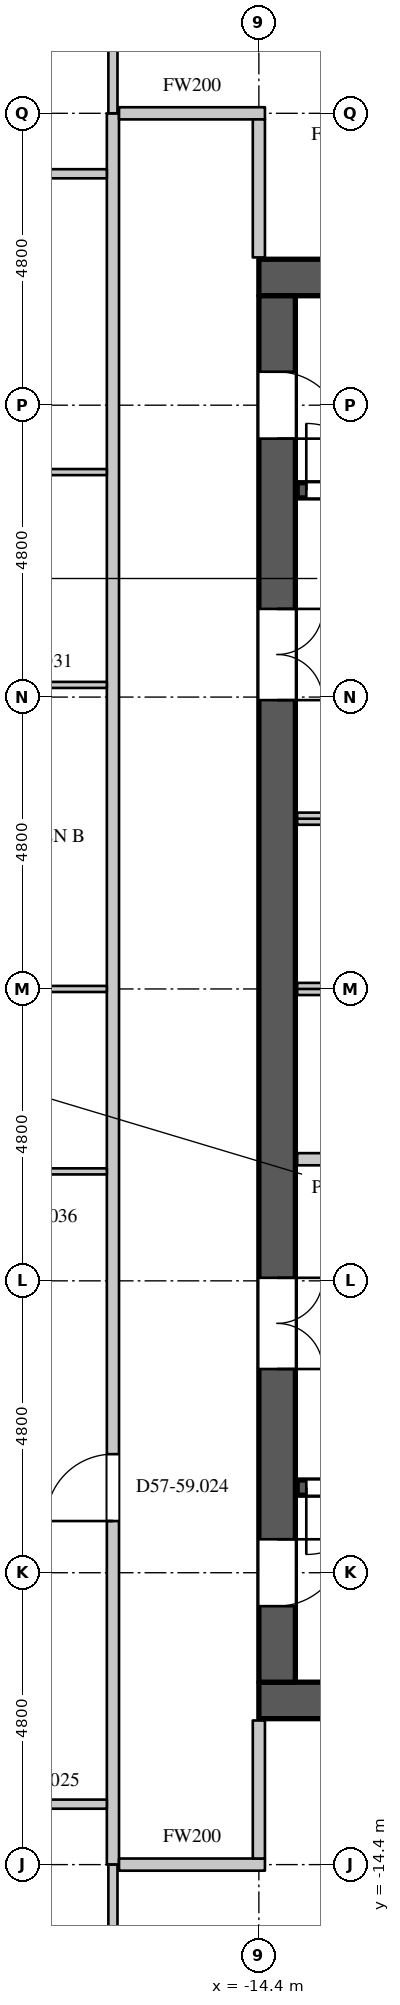
"""IFC4 building model, lengths in metres.
Left out: names, types, materials, properties, quantities, classifications, styles, units other than length and angle.
Written with IfcOpenShell. Run it as: python <this file> out.ifc"""

import sys

from ifc_helpers import new_model, si_unit, direction, frame, frame_2d, origin, place, context, subcontext, project, spatial, rectangle, extrude, element, fill, save


model = new_model("IFC4")
c1 = context("Model", 3, precision=1e-05, world=origin(), true_north=direction((0.0, 1.0)))
c2 = subcontext(c1, "Body", "Model", "MODEL_VIEW")
j1 = project(units=[si_unit("LENGTHUNIT", "METRE"), si_unit("PLANEANGLEUNIT", "RADIAN")], contexts=[c1])
p1 = place(None, origin())
s1 = spatial("IfcSite", under=j1, at=p1, CompositionType="ELEMENT")
p2 = place(p1, origin())
s2 = spatial("IfcBuilding", under=s1, at=p2, CompositionType="ELEMENT")
p3 = place(p2, frame((0.0, 0.0, 247.5)))
s3 = spatial("IfcBuildingStorey", under=s2, at=p3, CompositionType="ELEMENT", Elevation=247.5)
for number, where, z_axis, x_axis in (
    (1, (-14.4, 11.7, 0.0), (0.0, 0.0, 1.0), (1.0, 0.0, 0.0)),
    (2, (-14.4, -11.7, 0.0), (0.0, 0.0, 1.0), (1.0, 0.0, 0.0)),
):
    element("IfcWall", number, at=place(p3, frame(where, z_axis=z_axis, x_axis=x_axis)), inside=s3, PredefinedType="SHEAR", context=c2, shape_type="SweptSolid", body=[
        extrude(rectangle(XDim=28.8, YDim=0.6, at=frame_2d((14.4, 0.0))), origin(), (0.0, 0.0, 1.0), 4.2),
    ])
p4 = place(p3, frame((-14.1, -11.4, 0.0), z_axis=(0.0, 0.0, 1.0), x_axis=(0.0, 1.0, 0.0)))
e3 = element("IfcWall", 3, at=p4, inside=s3, PredefinedType="SHEAR", context=c2, shape_type="SweptSolid", body=[
    extrude(rectangle(XDim=22.8, YDim=0.6, at=frame_2d((11.4, 0.0))), origin(), (0.0, 0.0, 1.0), 4.2),
])
p5 = place(p4, frame((20.45, 0.0, 0.0)))
e4 = element("IfcOpeningElement", 4, at=p5, cuts=e3, PredefinedType="OPENING", context=c2, shape_type="SweptSolid", body=[
    extrude(rectangle(XDim=1.1, YDim=2.2, at=frame_2d((0.55, 1.1))), frame((0.0, 0.31, 0.0), z_axis=(0.0, -1.0, 0.0), x_axis=(1.0, 0.0, 0.0)), (0.0, 0.0, 1.0), 0.62),
])
p6 = place(p4, frame((1.25, 0.0, 0.0)))
e5 = element("IfcOpeningElement", 5, at=p6, cuts=e3, PredefinedType="OPENING", context=c2, shape_type="SweptSolid", body=[
    extrude(rectangle(XDim=1.1, YDim=2.2, at=frame_2d((0.55, 1.1))), frame((0.0, 0.31, 0.0), z_axis=(0.0, -1.0, 0.0), x_axis=(1.0, 0.0, 0.0)), (0.0, 0.0, 1.0), 0.62),
])
p7 = place(p4, frame((16.15, 0.0, 0.0)))
e6 = element("IfcOpeningElement", 6, at=p7, cuts=e3, PredefinedType="OPENING", context=c2, shape_type="SweptSolid", body=[
    extrude(rectangle(XDim=1.5, YDim=2.4, at=frame_2d((0.75, 1.2))), frame((0.0, 0.31, 0.0), z_axis=(0.0, -1.0, 0.0), x_axis=(1.0, 0.0, 0.0)), (0.0, 0.0, 1.0), 0.62),
])
p8 = place(p4, frame((5.15, 0.0, 0.0)))
e7 = element("IfcOpeningElement", 7, at=p8, cuts=e3, PredefinedType="OPENING", context=c2, shape_type="SweptSolid", body=[
    extrude(rectangle(XDim=1.5, YDim=2.4, at=frame_2d((0.75, 1.2))), frame((0.0, 0.31, 0.0), z_axis=(0.0, -1.0, 0.0), x_axis=(1.0, 0.0, 0.0)), (0.0, 0.0, 1.0), 0.62),
])
p9 = place(p3, frame((-16.8, -14.4, 0.0), z_axis=(0.0, 0.0, 1.0), x_axis=(0.0, 1.0, 0.0)))
e8 = element("IfcWall", 8, at=p9, inside=s3, PredefinedType="PARTITIONING", context=c2, shape_type="SweptSolid", body=[
    extrude(rectangle(XDim=28.8, YDim=0.2, at=frame_2d((14.4, 0.0))), origin(), (0.0, 0.0, 1.0), 3.95),
])
p10 = place(p9, frame((5.65, 0.0, 0.0)))
e9 = element("IfcOpeningElement", 9, at=p10, cuts=e8, PredefinedType="OPENING", context=c2, shape_type="SweptSolid", body=[
    extrude(rectangle(XDim=1.1, YDim=2.4, at=frame_2d((0.55, 1.2))), frame((0.0, 0.11, 0.0), z_axis=(0.0, -1.0, 0.0), x_axis=(1.0, 0.0, 0.0)), (0.0, 0.0, 1.0), 0.22),
])
for number, where, z_axis, x_axis in (
    (10, (-16.7, -14.4, 0.0), (0.0, 0.0, 1.0), (1.0, 0.0, 0.0)),
    (11, (-16.7, 14.4, 0.0), (0.0, 0.0, 1.0), (1.0, 0.0, 0.0)),
):
    element("IfcWall", number, at=place(p3, frame(where, z_axis=z_axis, x_axis=x_axis)), inside=s3, PredefinedType="PARTITIONING", context=c2, shape_type="SweptSolid", body=[
        extrude(rectangle(XDim=2.4, YDim=0.2, at=frame_2d((1.2, 0.0))), origin(), (0.0, 0.0, 1.0), 3.95),
    ])
for number, where, z_axis, x_axis in (
    (12, (-14.4, -14.3, 0.0), (0.0, 0.0, 1.0), (0.0, 1.0, 0.0)),
    (13, (-14.4, 12.03, 0.0), (0.0, 0.0, 1.0), (0.0, 1.0, 0.0)),
):
    element("IfcWall", number, at=place(p3, frame(where, z_axis=z_axis, x_axis=x_axis)), inside=s3, PredefinedType="PARTITIONING", context=c2, shape_type="SweptSolid", body=[
        extrude(rectangle(XDim=2.27, YDim=0.2, at=frame_2d((1.135, 0.0))), origin(), (0.0, 0.0, 1.0), 3.95),
    ])
p11 = place(p3, frame((-25.224, -13.406, 0.0), z_axis=(0.0, 0.0, 1.0), x_axis=(1.0, 0.0, 0.0)))
e14 = element("IfcWall", 14, at=p11, inside=s3, PredefinedType="PARTITIONING", context=c2, shape_type="SweptSolid", body=[
    extrude(rectangle(XDim=8.324, YDim=0.15, at=frame_2d((4.162, 0.0))), origin(), (0.0, 0.0, 1.0), 3.95),
])
p12 = place(p11, frame((5.993, 0.0, 0.0)))
e15 = element("IfcOpeningElement", 15, at=p12, cuts=e14, PredefinedType="OPENING", context=c2, shape_type="SweptSolid", body=[
    extrude(rectangle(XDim=0.95, YDim=2.2, at=frame_2d((0.475, 1.1))), frame((0.0, 0.085, 0.0), z_axis=(0.0, -1.0, 0.0), x_axis=(1.0, 0.0, 0.0)), (0.0, 0.0, 1.0), 0.17),
])
p13 = place(p3, frame((-25.224, 13.406, 0.0), z_axis=(0.0, 0.0, 1.0), x_axis=(1.0, 0.0, 0.0)))
e16 = element("IfcWall", 16, at=p13, inside=s3, PredefinedType="PARTITIONING", context=c2, shape_type="SweptSolid", body=[
    extrude(rectangle(XDim=8.324, YDim=0.15, at=frame_2d((4.162, 0.0))), origin(), (0.0, 0.0, 1.0), 3.95),
])
p14 = place(p13, frame((1.693, 0.0, 0.0)))
e17 = element("IfcOpeningElement", 17, at=p14, cuts=e16, PredefinedType="OPENING", context=c2, shape_type="SweptSolid", body=[
    extrude(rectangle(XDim=1.5, YDim=2.2, at=frame_2d((0.75, 1.1))), frame((0.0, 0.085, 0.0), z_axis=(0.0, -1.0, 0.0), x_axis=(1.0, 0.0, 0.0)), (0.0, 0.0, 1.0), 0.17),
])
p15 = place(p3, frame((-16.8, -19.828, 0.0), z_axis=(0.0, 0.0, 1.0), x_axis=(0.0, 1.0, 0.0)))
e18 = element("IfcWall", 18, at=p15, inside=s3, PredefinedType="PARTITIONING", context=c2, shape_type="SweptSolid", body=[
    extrude(rectangle(XDim=5.428, YDim=0.15, at=frame_2d((2.714, 0.0))), origin(), (0.0, 0.0, 1.0), 3.95),
])
p16 = place(p15, frame((3.1, 0.0, 0.0)))
e19 = element("IfcOpeningElement", 19, at=p16, cuts=e18, PredefinedType="OPENING", context=c2, shape_type="SweptSolid", body=[
    extrude(rectangle(XDim=0.95, YDim=2.2, at=frame_2d((0.475, 1.1))), frame((0.0, 0.085, 0.0), z_axis=(0.0, -1.0, 0.0), x_axis=(1.0, 0.0, 0.0)), (0.0, 0.0, 1.0), 0.17),
])
p17 = place(p3, frame((-16.8, 14.4, 0.0), z_axis=(0.0, 0.0, 1.0), x_axis=(0.0, 1.0, 0.0)))
e20 = element("IfcWall", 20, at=p17, inside=s3, PredefinedType="PARTITIONING", context=c2, shape_type="SweptSolid", body=[
    extrude(rectangle(XDim=5.428, YDim=0.15, at=frame_2d((2.714, 0.0))), origin(), (0.0, 0.0, 1.0), 3.95),
])
p18 = place(p17, frame((1.3, 0.0, 0.0)))
e21 = element("IfcOpeningElement", 21, at=p18, cuts=e20, PredefinedType="OPENING", context=c2, shape_type="SweptSolid", body=[
    extrude(rectangle(XDim=0.95, YDim=2.2, at=frame_2d((0.475, 1.1))), frame((0.0, 0.085, 0.0), z_axis=(0.0, -1.0, 0.0), x_axis=(1.0, 0.0, 0.0)), (0.0, 0.0, 1.0), 0.17),
])
p19 = place(p3, frame((-13.77, -2.8, 0.0), z_axis=(0.0, 0.0, 1.0), x_axis=(1.0, 0.0, 0.0)))
e22 = element("IfcWall", 22, at=p19, inside=s3, PredefinedType="PARTITIONING", context=c2, shape_type="SweptSolid", body=[
    extrude(rectangle(XDim=3.37, YDim=0.2, at=frame_2d((1.685, 0.0))), origin(), (0.0, 0.0, 1.0), 3.95),
])
p20 = place(p19, frame((1.35, 0.0, 0.0)))
e23 = element("IfcOpeningElement", 23, at=p20, cuts=e22, PredefinedType="OPENING", context=c2, shape_type="SweptSolid", body=[
    extrude(rectangle(XDim=0.6, YDim=2.0, at=frame_2d((0.3, 1.0))), frame((0.0, 0.11, 0.0), z_axis=(0.0, -1.0, 0.0), x_axis=(1.0, 0.0, 0.0)), (0.0, 0.0, 1.0), 0.22),
])
p21 = place(p3, frame((-13.77, 0.0, 0.0), z_axis=(0.0, 0.0, 1.0), x_axis=(1.0, 0.0, 0.0)))
e24 = element("IfcWall", 24, at=p21, inside=s3, PredefinedType="PARTITIONING", context=c2, shape_type="SweptSolid", body=[
    extrude(rectangle(XDim=21.57, YDim=0.2, at=frame_2d((10.785, 0.0))), origin(), (0.0, 0.0, 1.0), 3.95),
])
p22 = place(p3, frame((-13.77, 2.8, 0.0), z_axis=(0.0, 0.0, 1.0), x_axis=(1.0, 0.0, 0.0)))
e25 = element("IfcWall", 25, at=p22, inside=s3, PredefinedType="PARTITIONING", context=c2, shape_type="SweptSolid", body=[
    extrude(rectangle(XDim=5.95, YDim=0.2, at=frame_2d((2.975, 0.0))), origin(), (0.0, 0.0, 1.0), 3.95),
])
p23 = place(p22, frame((1.1, 0.0, 0.0)))
e26 = element("IfcOpeningElement", 26, at=p23, cuts=e25, PredefinedType="OPENING", context=c2, shape_type="SweptSolid", body=[
    extrude(rectangle(XDim=1.1, YDim=2.2, at=frame_2d((0.55, 1.1))), frame((0.0, 0.11, 0.0), z_axis=(0.0, -1.0, 0.0), x_axis=(1.0, 0.0, 0.0)), (0.0, 0.0, 1.0), 0.22),
])
p24 = place(p22, frame((4.1, 0.0, 0.0)))
e27 = element("IfcOpeningElement", 27, at=p24, cuts=e25, PredefinedType="OPENING", context=c2, shape_type="SweptSolid", body=[
    extrude(rectangle(XDim=1.1, YDim=2.2, at=frame_2d((0.55, 1.1))), frame((0.0, 0.11, 0.0), z_axis=(0.0, -1.0, 0.0), x_axis=(1.0, 0.0, 0.0)), (0.0, 0.0, 1.0), 0.22),
])
p25 = place(p3, frame((-13.77, -8.2, 0.0), z_axis=(0.0, 0.0, 1.0), x_axis=(1.0, 0.0, 0.0)))
e28 = element("IfcWall", 28, at=p25, inside=s3, PredefinedType="SHEAR", context=c2, shape_type="SweptSolid", body=[
    extrude(rectangle(XDim=8.495, YDim=0.25, at=frame_2d((4.248, 0.0))), origin(), (0.0, 0.0, 1.0), 3.95),
])
p26 = place(p25, frame((0.15, 0.0, 0.0)))
e29 = element("IfcOpeningElement", 29, at=p26, cuts=e28, PredefinedType="OPENING", context=c2, shape_type="SweptSolid", body=[
    extrude(rectangle(XDim=1.1, YDim=2.2, at=frame_2d((0.55, 1.1))), frame((0.0, 0.135, 0.0), z_axis=(0.0, -1.0, 0.0), x_axis=(1.0, 0.0, 0.0)), (0.0, 0.0, 1.0), 0.27),
])
p27 = place(p3, frame((-13.77, 8.2, 0.0), z_axis=(0.0, 0.0, 1.0), x_axis=(1.0, 0.0, 0.0)))
e30 = element("IfcWall", 30, at=p27, inside=s3, PredefinedType="SHEAR", context=c2, shape_type="SweptSolid", body=[
    extrude(rectangle(XDim=8.495, YDim=0.25, at=frame_2d((4.248, 0.0))), origin(), (0.0, 0.0, 1.0), 3.95),
])
p28 = place(p27, frame((0.15, 0.0, 0.0)))
e31 = element("IfcOpeningElement", 31, at=p28, cuts=e30, PredefinedType="OPENING", context=c2, shape_type="SweptSolid", body=[
    extrude(rectangle(XDim=1.1, YDim=2.2, at=frame_2d((0.55, 1.1))), frame((0.0, 0.135, 0.0), z_axis=(0.0, -1.0, 0.0), x_axis=(1.0, 0.0, 0.0)), (0.0, 0.0, 1.0), 0.27),
])
p29 = place(p3, frame((-20.85, -3.0, 0.0), z_axis=(0.0, 0.0, 1.0), x_axis=(1.0, 0.0, 0.0)))
e32 = element("IfcWall", 32, at=p29, inside=s3, PredefinedType="PARTITIONING", context=c2, shape_type="SweptSolid", body=[
    extrude(rectangle(XDim=3.95, YDim=0.1, at=frame_2d((1.975, 0.0))), origin(), (0.0, 0.0, 1.0), 3.95),
])
p30 = place(p29, frame((1.5, 0.0, 0.0)))
e33 = element("IfcOpeningElement", 33, at=p30, cuts=e32, PredefinedType="OPENING", context=c2, shape_type="SweptSolid", body=[
    extrude(rectangle(XDim=0.9, YDim=2.2, at=frame_2d((0.45, 1.1))), frame((0.0, 0.06, 0.0), z_axis=(0.0, -1.0, 0.0), x_axis=(1.0, 0.0, 0.0)), (0.0, 0.0, 1.0), 0.12),
])
p31 = place(p3, frame((-20.88, 0.0, 0.0), z_axis=(0.0, 0.0, 1.0), x_axis=(1.0, 0.0, 0.0)))
e34 = element("IfcWall", 34, at=p31, inside=s3, PredefinedType="PARTITIONING", context=c2, shape_type="SweptSolid", body=[
    extrude(rectangle(XDim=3.98, YDim=0.1, at=frame_2d((1.99, 0.0))), origin(), (0.0, 0.0, 1.0), 3.95),
])
p32 = place(p3, frame((-20.825, 5.0, 0.0), z_axis=(0.0, 0.0, 1.0), x_axis=(1.0, 0.0, 0.0)))
e35 = element("IfcWall", 35, at=p32, inside=s3, PredefinedType="PARTITIONING", context=c2, shape_type="SweptSolid", body=[
    extrude(rectangle(XDim=3.925, YDim=0.1, at=frame_2d((1.962, 0.0))), origin(), (0.0, 0.0, 1.0), 3.95),
])
p33 = place(p32, frame((1.5, 0.0, 0.0)))
e36 = element("IfcOpeningElement", 36, at=p33, cuts=e35, PredefinedType="OPENING", context=c2, shape_type="SweptSolid", body=[
    extrude(rectangle(XDim=0.9, YDim=2.2, at=frame_2d((0.45, 1.1))), frame((0.0, 0.06, 0.0), z_axis=(0.0, -1.0, 0.0), x_axis=(1.0, 0.0, 0.0)), (0.0, 0.0, 1.0), 0.12),
])
p34 = place(p3, frame((-20.825, 8.5, 0.0), z_axis=(0.0, 0.0, 1.0), x_axis=(1.0, 0.0, 0.0)))
e37 = element("IfcWall", 37, at=p34, inside=s3, PredefinedType="PARTITIONING", context=c2, shape_type="SweptSolid", body=[
    extrude(rectangle(XDim=3.925, YDim=0.1, at=frame_2d((1.962, 0.0))), origin(), (0.0, 0.0, 1.0), 3.95),
])
p35 = place(p28, origin())
e38 = element("IfcDoor", 38, at=p35, inside=s3, OperationType="SINGLE_SWING_LEFT", PredefinedType="DOOR", context=c2, shape_type="SweptSolid", body=[
    extrude(rectangle(XDim=1.1, YDim=2.2, at=frame_2d((0.55, 1.1))), frame((0.0, 0.025, 0.0), z_axis=(0.0, -1.0, 0.0), x_axis=(1.0, 0.0, 0.0)), (0.0, 0.0, 1.0), 0.05),
])
fill(e31, e38)
p36 = place(p26, origin())
e39 = element("IfcDoor", 39, at=p36, inside=s3, OperationType="SINGLE_SWING_RIGHT", PredefinedType="DOOR", context=c2, shape_type="SweptSolid", body=[
    extrude(rectangle(XDim=1.1, YDim=2.2, at=frame_2d((0.55, 1.1))), frame((0.0, 0.025, 0.0), z_axis=(0.0, -1.0, 0.0), x_axis=(1.0, 0.0, 0.0)), (0.0, 0.0, 1.0), 0.05),
])
fill(e29, e39)
p37 = place(p5, origin())
e40 = element("IfcDoor", 40, at=p37, inside=s3, OperationType="SINGLE_SWING_RIGHT", PredefinedType="DOOR", context=c2, shape_type="SweptSolid", body=[
    extrude(rectangle(XDim=1.1, YDim=2.2, at=frame_2d((0.55, 1.1))), frame((0.0, -0.245, 0.0), z_axis=(0.0, -1.0, 0.0), x_axis=(1.0, 0.0, 0.0)), (0.0, 0.0, 1.0), 0.05),
])
fill(e4, e40)
p38 = place(p6, origin())
e41 = element("IfcDoor", 41, at=p38, inside=s3, OperationType="SINGLE_SWING_LEFT", PredefinedType="DOOR", context=c2, shape_type="SweptSolid", body=[
    extrude(rectangle(XDim=1.1, YDim=2.2, at=frame_2d((0.55, 1.1))), frame((0.0, -0.245, 0.0), z_axis=(0.0, -1.0, 0.0), x_axis=(1.0, 0.0, 0.0)), (0.0, 0.0, 1.0), 0.05),
])
fill(e5, e41)
p39 = place(p7, origin())
e42 = element("IfcDoor", 42, at=p39, inside=s3, OperationType="DOUBLE_DOOR_SINGLE_SWING", PredefinedType="DOOR", context=c2, shape_type="SweptSolid", body=[
    extrude(rectangle(XDim=1.5, YDim=2.4, at=frame_2d((0.75, 1.2))), frame((0.0, -0.245, 0.0), z_axis=(0.0, -1.0, 0.0), x_axis=(1.0, 0.0, 0.0)), (0.0, 0.0, 1.0), 0.05),
])
fill(e6, e42)
p40 = place(p8, origin())
e43 = element("IfcDoor", 43, at=p40, inside=s3, OperationType="DOUBLE_DOOR_SINGLE_SWING", PredefinedType="DOOR", context=c2, shape_type="SweptSolid", body=[
    extrude(rectangle(XDim=1.5, YDim=2.4, at=frame_2d((0.75, 1.2))), frame((0.0, -0.245, 0.0), z_axis=(0.0, -1.0, 0.0), x_axis=(1.0, 0.0, 0.0)), (0.0, 0.0, 1.0), 0.05),
])
fill(e7, e43)
p41 = place(p10, origin())
e44 = element("IfcDoor", 44, at=p41, inside=s3, OperationType="SINGLE_SWING_LEFT", PredefinedType="DOOR", context=c2, shape_type="SweptSolid", body=[
    extrude(rectangle(XDim=1.1, YDim=2.4, at=frame_2d((0.55, 1.2))), frame((0.0, 0.025, 0.0), z_axis=(0.0, -1.0, 0.0), x_axis=(1.0, 0.0, 0.0)), (0.0, 0.0, 1.0), 0.05),
])
fill(e9, e44)
save(model, sys.argv[1])
